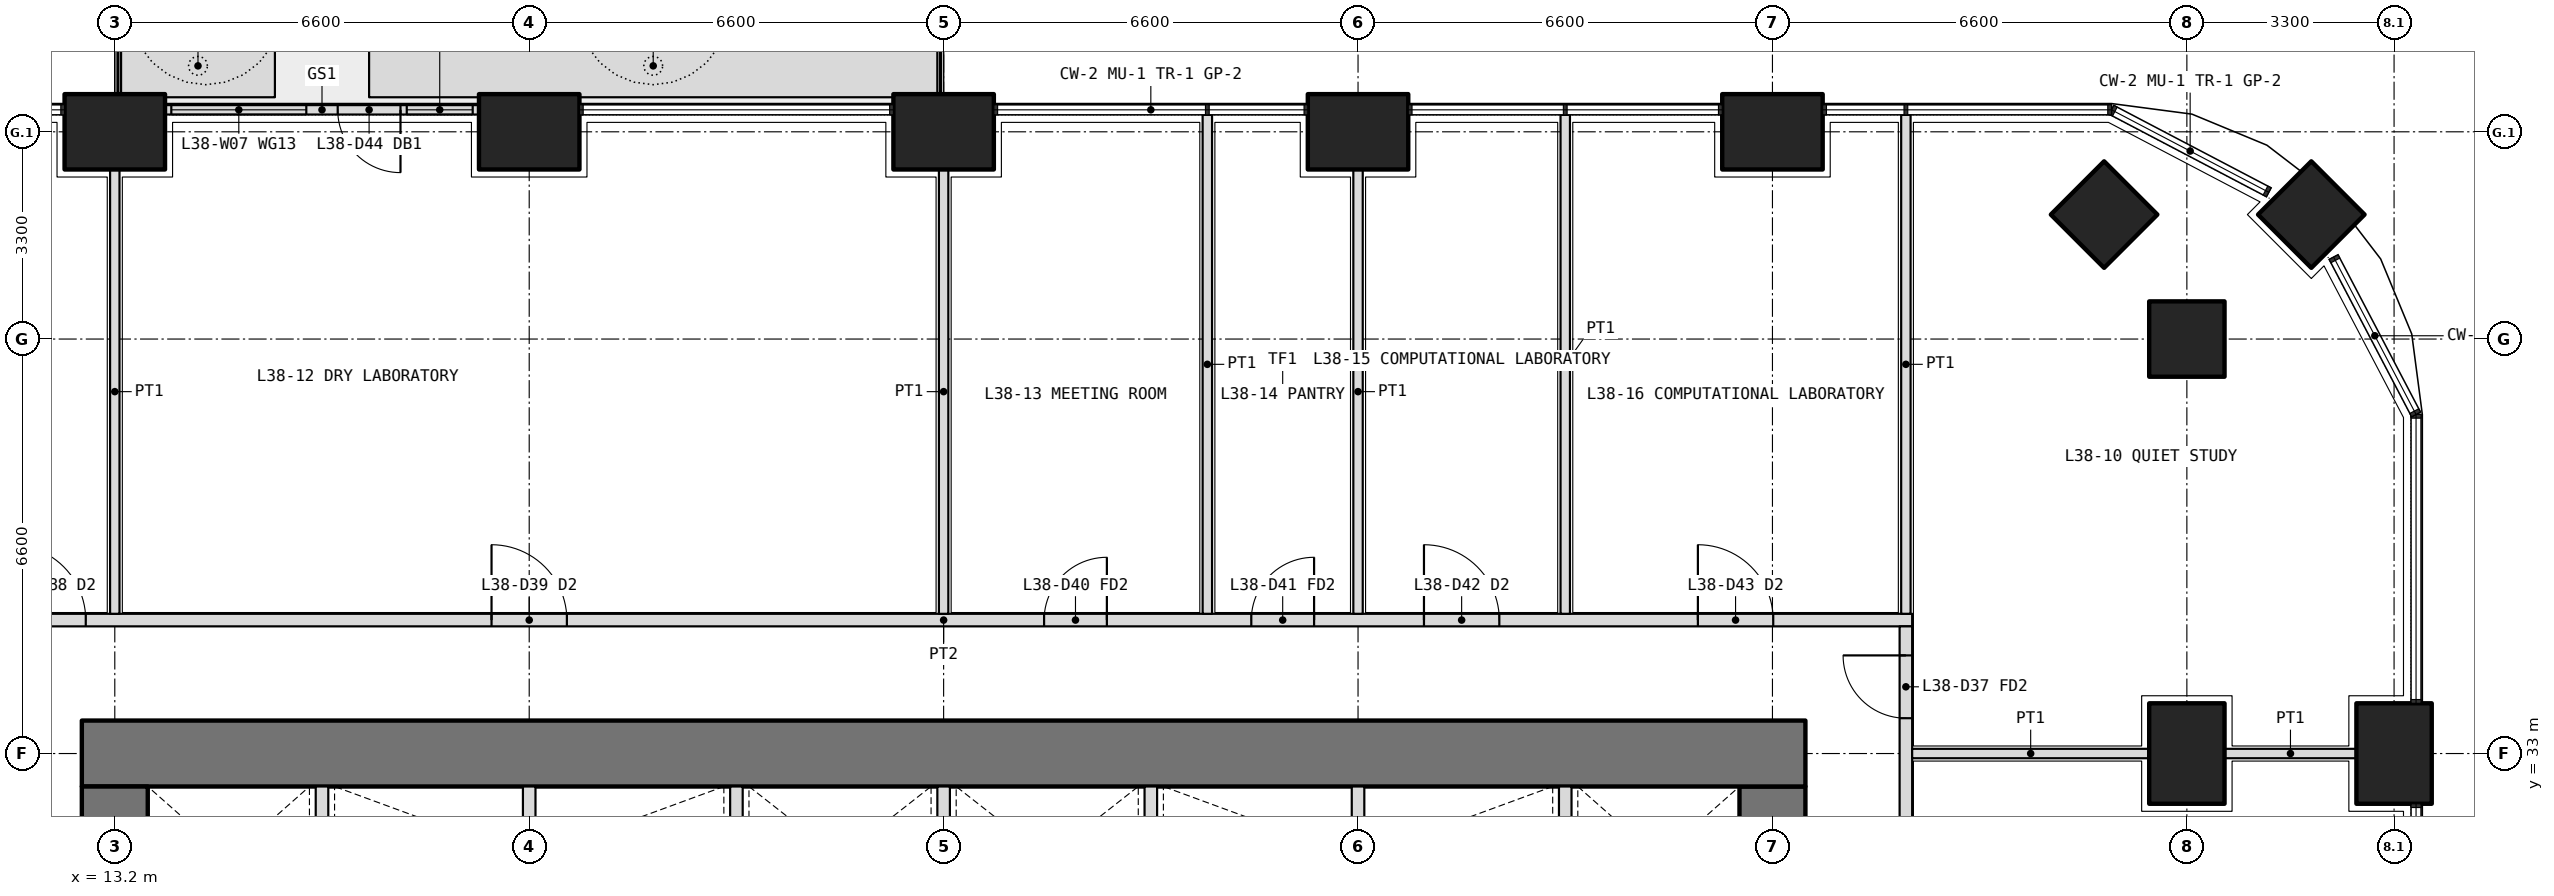
"""IFC4 building model, lengths in metres.
Left out: names, types, materials, properties, quantities, classifications, styles, units other than length and angle.
Written with IfcOpenShell. Run it as: python <this file> out.ifc"""

import sys

from ifc_helpers import new_model, si_unit, direction, frame, frame_2d, origin, origin_2d, place, context, subcontext, project, spatial, polyline, rectangle, outline, extrude, element, fill, save


model = new_model("IFC4")
c1 = context("Model", 3, precision=1e-05, world=origin(), true_north=direction((0.0, 1.0)))
c2 = subcontext(c1, "Body", "Model", "MODEL_VIEW")
j1 = project(units=[si_unit("LENGTHUNIT", "METRE"), si_unit("PLANEANGLEUNIT", "RADIAN")], contexts=[c1])
p1 = place(None, origin())
s1 = spatial("IfcSite", under=j1, at=p1, CompositionType="ELEMENT")
p2 = place(p1, origin())
s2 = spatial("IfcBuilding", under=s1, at=p2, CompositionType="ELEMENT")
p3 = place(p2, frame((0.0, 0.0, 168.3)))
s3 = spatial("IfcBuildingStorey", under=s2, at=p3, CompositionType="ELEMENT", Elevation=168.3)
p4 = place(p3, frame((48.182, 41.582, 0.0), z_axis=(0.0, 0.0, 1.0), x_axis=(0.707106781187, 0.707106781187, 0.0)))
e1 = element("IfcColumn", 1, at=p4, inside=s3, PredefinedType="COLUMN", context=c2, shape_type="SweptSolid", body=[
    extrude(rectangle(XDim=1.2, YDim=1.2, at=origin_2d()), origin(), (0.0, 0.0, 1.0), 4.2),
])
for number, where, z_axis, x_axis in (
    (2, (49.5, 33.0, 0.0), (0.0, 0.0, 1.0), (0.0, 1.0, 0.0)),
    (3, (13.2, 42.9, 0.0), (0.0, 0.0, 1.0), (1.0, 0.0, 0.0)),
    (4, (19.8, 42.9, 0.0), (0.0, 0.0, 1.0), (1.0, 0.0, 0.0)),
    (5, (26.4, 42.9, 0.0), (0.0, 0.0, 1.0), (1.0, 0.0, 0.0)),
    (6, (33.0, 42.9, 0.0), (0.0, 0.0, 1.0), (1.0, 0.0, 0.0)),
    (7, (39.6, 42.9, 0.0), (0.0, 0.0, 1.0), (1.0, 0.0, 0.0)),
):
    element("IfcColumn", number, at=place(p3, frame(where, z_axis=z_axis, x_axis=x_axis)), inside=s3, PredefinedType="COLUMN", context=c2, shape_type="SweptSolid", body=[
        extrude(rectangle(XDim=1.6, YDim=1.2, at=origin_2d()), origin(), (0.0, 0.0, 1.0), 4.2),
    ])
for number, where, z_axis, x_axis in (
    (8, (46.2, 39.6, 0.0), (0.0, 0.0, 1.0), (1.0, 0.0, 0.0)),
    (9, (44.882, 41.582, 0.0), (0.0, 0.0, 1.0), (0.707, 0.707, 0.0)),
):
    element("IfcColumn", number, at=place(p3, frame(where, z_axis=z_axis, x_axis=x_axis)), inside=s3, PredefinedType="COLUMN", context=c2, shape_type="SweptSolid", body=[
        extrude(rectangle(XDim=1.2, YDim=1.2, at=origin_2d()), origin(), (0.0, 0.0, 1.0), 4.2),
    ])
p5 = place(p3, frame((46.2, 33.0, 0.0), z_axis=(0.0, 0.0, 1.0), x_axis=(0.0, 1.0, 0.0)))
e10 = element("IfcColumn", 10, at=p5, inside=s3, PredefinedType="COLUMN", context=c2, shape_type="SweptSolid", body=[
    extrude(rectangle(XDim=1.6, YDim=1.2, at=origin_2d()), origin(), (0.0, 0.0, 1.0), 4.2),
])
p6 = place(p3, origin())
e11 = element("IfcWall", 11, at=p6, inside=s3, PredefinedType="USERDEFINED", context=c2, shape_type="SweptSolid", body=[
    extrude(outline(polyline([(13.3, 43.45), (15.75, 43.45), (15.75, 44.45), (13.3, 44.45), (13.3, 43.45)]), holes=[polyline([(13.45, 43.6), (15.6, 43.6), (15.6, 44.3), (13.45, 44.3), (13.45, 43.6)])]), origin(), (0.0, 0.0, 1.0), 1.05),
])
p7 = place(p3, origin())
e12 = element("IfcWall", 12, at=p7, inside=s3, PredefinedType="USERDEFINED", context=c2, shape_type="SweptSolid", body=[
    extrude(outline(polyline([(17.25, 43.45), (26.3, 43.45), (26.3, 44.45), (17.25, 44.45), (17.25, 43.45)]), holes=[polyline([(17.4, 43.6), (26.15, 43.6), (26.15, 44.3), (17.4, 44.3), (17.4, 43.6)])]), origin(), (0.0, 0.0, 1.0), 1.05),
])
p8 = place(p3, frame((19.0, 43.25, 0.0), z_axis=(0.0, 0.0, 1.0), x_axis=(-1.0, 0.0, 0.0)))
e13 = element("IfcWall", 13, at=p8, inside=s3, PredefinedType="SOLIDWALL", context=c2, shape_type="SweptSolid", body=[
    extrude(rectangle(XDim=5.0, YDim=0.15, at=frame_2d((2.5, 0.0))), origin(), (0.0, 0.0, 1.0), 2.7),
])
p9 = place(p8, frame((1.25, 0.0, 0.0)))
e14 = element("IfcOpeningElement", 14, at=p9, cuts=e13, PredefinedType="OPENING", context=c2, shape_type="SweptSolid", body=[
    extrude(rectangle(XDim=1.0, YDim=2.4, at=frame_2d((0.5, 1.2))), frame((0.0, 0.085, 0.0), z_axis=(0.0, -1.0, 0.0), x_axis=(1.0, 0.0, 0.0)), (0.0, 0.0, 1.0), 0.17),
])
p10 = place(p8, frame((0.1, 0.0, 0.1)))
e15 = element("IfcOpeningElement", 15, at=p10, cuts=e13, PredefinedType="OPENING", context=c2, shape_type="SweptSolid", body=[
    extrude(rectangle(XDim=1.05, YDim=2.3, at=frame_2d((0.525, 1.15))), frame((0.0, 0.085, 0.0), z_axis=(0.0, -1.0, 0.0), x_axis=(1.0, 0.0, 0.0)), (0.0, 0.0, 1.0), 0.17),
])
p11 = place(p8, frame((2.75, 0.0, 0.1)))
e16 = element("IfcOpeningElement", 16, at=p11, cuts=e13, PredefinedType="OPENING", context=c2, shape_type="SweptSolid", body=[
    extrude(rectangle(XDim=2.15, YDim=2.3, at=frame_2d((1.075, 1.15))), frame((0.0, 0.085, 0.0), z_axis=(0.0, -1.0, 0.0), x_axis=(1.0, 0.0, 0.0)), (0.0, 0.0, 1.0), 0.17),
])
p12 = place(p3, frame((39.6, 13.725, 0.0), z_axis=(0.0, 0.0, 1.0), x_axis=(0.0, 1.0, 0.0)))
e17 = element("IfcWall", 17, at=p12, inside=s3, PredefinedType="SHEAR", context=c2, shape_type="SweptSolid", body=[
    extrude(rectangle(XDim=18.75, YDim=1.05, at=frame_2d((9.375, 0.0))), origin(), (0.0, 0.0, 1.0), 4.2),
])
p13 = place(p12, frame((3.025, 0.0, 0.0)))
e18 = element("IfcOpeningElement", 18, at=p13, cuts=e17, PredefinedType="OPENING", context=c2, shape_type="SweptSolid", body=[
    extrude(rectangle(XDim=1.6, YDim=2.1, at=frame_2d((0.8, 1.05))), frame((0.0, 0.535, 0.0), z_axis=(0.0, -1.0, 0.0), x_axis=(1.0, 0.0, 0.0)), (0.0, 0.0, 1.0), 1.07),
])
p14 = place(p12, frame((13.825, 0.0, 0.0)))
e19 = element("IfcOpeningElement", 19, at=p14, cuts=e17, PredefinedType="OPENING", context=c2, shape_type="SweptSolid", body=[
    extrude(rectangle(XDim=1.6, YDim=2.1, at=frame_2d((0.8, 1.05))), frame((0.0, 0.535, 0.0), z_axis=(0.0, -1.0, 0.0), x_axis=(1.0, 0.0, 0.0)), (0.0, 0.0, 1.0), 1.07),
])
p15 = place(p3, frame((40.125, 33.0, 0.0), z_axis=(0.0, 0.0, 1.0), x_axis=(-1.0, 0.0, 0.0)))
e20 = element("IfcWall", 20, at=p15, inside=s3, PredefinedType="SHEAR", context=c2, shape_type="SweptSolid", body=[
    extrude(rectangle(XDim=27.45, YDim=1.05, at=frame_2d((13.725, 0.0))), origin(), (0.0, 0.0, 1.0), 4.2),
])
p16 = place(p3, frame((13.2, 32.475, 0.0), z_axis=(0.0, 0.0, 1.0), x_axis=(0.0, -1.0, 0.0)))
e21 = element("IfcWall", 21, at=p16, inside=s3, PredefinedType="SHEAR", context=c2, shape_type="SweptSolid", body=[
    extrude(rectangle(XDim=18.75, YDim=1.05, at=frame_2d((9.375, 0.0))), origin(), (0.0, 0.0, 1.0), 4.2),
])
p17 = place(p16, frame((14.125, 0.0, 0.0)))
e22 = element("IfcOpeningElement", 22, at=p17, cuts=e21, PredefinedType="OPENING", context=c2, shape_type="SweptSolid", body=[
    extrude(rectangle(XDim=1.6, YDim=2.1, at=frame_2d((0.8, 1.05))), frame((0.0, 0.535, 0.0), z_axis=(0.0, -1.0, 0.0), x_axis=(1.0, 0.0, 0.0)), (0.0, 0.0, 1.0), 1.07),
])
p18 = place(p16, frame((3.325, 0.0, 0.0)))
e23 = element("IfcOpeningElement", 23, at=p18, cuts=e21, PredefinedType="OPENING", context=c2, shape_type="SweptSolid", body=[
    extrude(rectangle(XDim=1.6, YDim=2.1, at=frame_2d((0.8, 1.05))), frame((0.0, 0.535, 0.0), z_axis=(0.0, -1.0, 0.0), x_axis=(1.0, 0.0, 0.0)), (0.0, 0.0, 1.0), 1.07),
])
for number, where, z_axis, x_axis in (
    (24, (16.5, 30.2, 0.0), (0.0, 0.0, 1.0), (0.0, 1.0, 0.0)),
    (25, (19.8, 30.2, 0.0), (0.0, 0.0, 1.0), (0.0, 1.0, 0.0)),
    (26, (23.1, 30.2, 0.0), (0.0, 0.0, 1.0), (0.0, 1.0, 0.0)),
    (27, (26.4, 30.2, 0.0), (0.0, 0.0, 1.0), (0.0, 1.0, 0.0)),
    (28, (29.7, 30.2, 0.0), (0.0, 0.0, 1.0), (0.0, 1.0, 0.0)),
    (29, (33.0, 30.2, 0.0), (0.0, 0.0, 1.0), (0.0, 1.0, 0.0)),
    (30, (36.3, 30.2, 0.0), (0.0, 0.0, 1.0), (0.0, 1.0, 0.0)),
):
    element("IfcWall", number, at=place(p3, frame(where, z_axis=z_axis, x_axis=x_axis)), inside=s3, PredefinedType="PARTITIONING", context=c2, shape_type="SweptSolid", body=[
        extrude(rectangle(XDim=2.275, YDim=0.2, at=frame_2d((1.138, 0.0))), origin(), (0.0, 0.0, 1.0), 4.2),
    ])
p19 = place(p3, frame((10.975, 35.125, 0.0), z_axis=(0.0, 0.0, 1.0), x_axis=(1.0, 0.0, 0.0)))
e31 = element("IfcWall", 31, at=p19, inside=s3, PredefinedType="PARTITIONING", context=c2, shape_type="SweptSolid", body=[
    extrude(rectangle(XDim=30.85, YDim=0.2, at=frame_2d((15.425, 0.0))), origin(), (0.0, 0.0, 1.0), 2.85),
])
p20 = place(p19, frame((0.562, 0.0, 0.0)))
e32 = element("IfcOpeningElement", 32, at=p20, cuts=e31, PredefinedType="OPENING", context=c2, shape_type="SweptSolid", body=[
    extrude(rectangle(XDim=1.2, YDim=2.1, at=frame_2d((0.6, 1.05))), frame((0.0, 0.11, 0.0), z_axis=(0.0, -1.0, 0.0), x_axis=(1.0, 0.0, 0.0)), (0.0, 0.0, 1.0), 0.22),
])
p21 = place(p19, frame((8.225, 0.0, 0.0)))
e33 = element("IfcOpeningElement", 33, at=p21, cuts=e31, PredefinedType="OPENING", context=c2, shape_type="SweptSolid", body=[
    extrude(rectangle(XDim=1.2, YDim=2.1, at=frame_2d((0.6, 1.05))), frame((0.0, 0.11, 0.0), z_axis=(0.0, -1.0, 0.0), x_axis=(1.0, 0.0, 0.0)), (0.0, 0.0, 1.0), 0.22),
])
p22 = place(p19, frame((17.025, 0.0, 0.0)))
e34 = element("IfcOpeningElement", 34, at=p22, cuts=e31, PredefinedType="OPENING", context=c2, shape_type="SweptSolid", body=[
    extrude(rectangle(XDim=1.0, YDim=2.1, at=frame_2d((0.5, 1.05))), frame((0.0, 0.11, 0.0), z_axis=(0.0, -1.0, 0.0), x_axis=(1.0, 0.0, 0.0)), (0.0, 0.0, 1.0), 0.22),
])
p23 = place(p19, frame((20.325, 0.0, 0.0)))
e35 = element("IfcOpeningElement", 35, at=p23, cuts=e31, PredefinedType="OPENING", context=c2, shape_type="SweptSolid", body=[
    extrude(rectangle(XDim=1.0, YDim=2.1, at=frame_2d((0.5, 1.05))), frame((0.0, 0.11, 0.0), z_axis=(0.0, -1.0, 0.0), x_axis=(1.0, 0.0, 0.0)), (0.0, 0.0, 1.0), 0.22),
])
p24 = place(p19, frame((23.075, 0.0, 0.0)))
e36 = element("IfcOpeningElement", 36, at=p24, cuts=e31, PredefinedType="OPENING", context=c2, shape_type="SweptSolid", body=[
    extrude(rectangle(XDim=1.2, YDim=2.1, at=frame_2d((0.6, 1.05))), frame((0.0, 0.11, 0.0), z_axis=(0.0, -1.0, 0.0), x_axis=(1.0, 0.0, 0.0)), (0.0, 0.0, 1.0), 0.22),
])
p25 = place(p19, frame((27.438, 0.0, 0.0)))
e37 = element("IfcOpeningElement", 37, at=p25, cuts=e31, PredefinedType="OPENING", context=c2, shape_type="SweptSolid", body=[
    extrude(rectangle(XDim=1.2, YDim=2.1, at=frame_2d((0.6, 1.05))), frame((0.0, 0.11, 0.0), z_axis=(0.0, -1.0, 0.0), x_axis=(1.0, 0.0, 0.0)), (0.0, 0.0, 1.0), 0.22),
])
p26 = place(p3, frame((41.725, 11.175, 0.0), z_axis=(0.0, 0.0, 1.0), x_axis=(0.0, 1.0, 0.0)))
e38 = element("IfcWall", 38, at=p26, inside=s3, PredefinedType="PARTITIONING", context=c2, shape_type="SweptSolid", body=[
    extrude(rectangle(XDim=23.85, YDim=0.2, at=frame_2d((11.925, 0.0))), origin(), (0.0, 0.0, 1.0), 2.85),
])
p27 = place(p26, frame((3.762, 0.0, 0.0)))
e39 = element("IfcOpeningElement", 39, at=p27, cuts=e38, PredefinedType="OPENING", context=c2, shape_type="SweptSolid", body=[
    extrude(rectangle(XDim=1.0, YDim=2.1, at=frame_2d((0.5, 1.05))), frame((0.0, 0.11, 0.0), z_axis=(0.0, -1.0, 0.0), x_axis=(1.0, 0.0, 0.0)), (0.0, 0.0, 1.0), 0.22),
])
p28 = place(p26, frame((9.625, 0.0, 0.0)))
e40 = element("IfcOpeningElement", 40, at=p28, cuts=e38, PredefinedType="OPENING", context=c2, shape_type="SweptSolid", body=[
    extrude(rectangle(XDim=1.0, YDim=2.1, at=frame_2d((0.5, 1.05))), frame((0.0, 0.11, 0.0), z_axis=(0.0, -1.0, 0.0), x_axis=(1.0, 0.0, 0.0)), (0.0, 0.0, 1.0), 0.22),
])
p29 = place(p26, frame((12.975, 0.0, 0.0)))
e41 = element("IfcOpeningElement", 41, at=p29, cuts=e38, PredefinedType="OPENING", context=c2, shape_type="SweptSolid", body=[
    extrude(rectangle(XDim=0.9, YDim=2.1, at=frame_2d((0.45, 1.05))), frame((0.0, 0.11, 0.0), z_axis=(0.0, -1.0, 0.0), x_axis=(1.0, 0.0, 0.0)), (0.0, 0.0, 1.0), 0.22),
])
p30 = place(p26, frame((17.925, 0.0, 0.0)))
e42 = element("IfcOpeningElement", 42, at=p30, cuts=e38, PredefinedType="OPENING", context=c2, shape_type="SweptSolid", body=[
    extrude(rectangle(XDim=1.2, YDim=2.1, at=frame_2d((0.6, 1.05))), frame((0.0, 0.11, 0.0), z_axis=(0.0, -1.0, 0.0), x_axis=(1.0, 0.0, 0.0)), (0.0, 0.0, 1.0), 0.22),
])
p31 = place(p26, frame((22.387, 0.0, 0.0)))
e43 = element("IfcOpeningElement", 43, at=p31, cuts=e38, PredefinedType="OPENING", context=c2, shape_type="SweptSolid", body=[
    extrude(rectangle(XDim=1.0, YDim=2.1, at=frame_2d((0.5, 1.05))), frame((0.0, 0.11, 0.0), z_axis=(0.0, -1.0, 0.0), x_axis=(1.0, 0.0, 0.0)), (0.0, 0.0, 1.0), 0.22),
])
p32 = place(p3, frame((41.725, 43.17, 0.0), z_axis=(0.0, 0.0, 1.0), x_axis=(0.0, -1.0, 0.0)))
e44 = element("IfcWall", 44, at=p32, inside=s3, PredefinedType="PARTITIONING", context=c2, shape_type="SweptSolid", body=[
    extrude(rectangle(XDim=7.945, YDim=0.15, at=frame_2d((3.972, 0.0))), origin(), (0.0, 0.0, 1.0), 2.7),
])
p33 = place(p3, frame((48.9, 33.0, 0.0), z_axis=(0.0, 0.0, 1.0), x_axis=(-1.0, 0.0, 0.0)))
e45 = element("IfcWall", 45, at=p33, inside=s3, PredefinedType="PARTITIONING", context=c2, shape_type="SweptSolid", body=[
    extrude(rectangle(XDim=2.1, YDim=0.15, at=frame_2d((1.05, 0.0))), origin(), (0.0, 0.0, 1.0), 2.85),
])
p34 = place(p3, frame((45.6, 33.0, 0.0), z_axis=(0.0, 0.0, 1.0), x_axis=(-1.0, 0.0, 0.0)))
e46 = element("IfcWall", 46, at=p34, inside=s3, PredefinedType="PARTITIONING", context=c2, shape_type="SweptSolid", body=[
    extrude(rectangle(XDim=3.775, YDim=0.15, at=frame_2d((1.888, 0.0))), origin(), (0.0, 0.0, 1.0), 2.85),
])
p35 = place(p3, frame((30.6, 43.17, 0.0), z_axis=(0.0, 0.0, 1.0), x_axis=(0.0, -1.0, 0.0)))
e47 = element("IfcWall", 47, at=p35, inside=s3, PredefinedType="PARTITIONING", context=c2, shape_type="SweptSolid", body=[
    extrude(rectangle(XDim=7.945, YDim=0.15, at=frame_2d((3.972, 0.0))), origin(), (0.0, 0.0, 1.0), 2.7),
])
for number, where, z_axis, x_axis in (
    (48, (33.0, 42.3, 0.0), (0.0, 0.0, 1.0), (0.0, -1.0, 0.0)),
    (49, (13.2, 42.3, 0.0), (0.0, 0.0, 1.0), (0.0, -1.0, 0.0)),
    (50, (26.4, 42.3, 0.0), (0.0, 0.0, 1.0), (0.0, -1.0, 0.0)),
):
    element("IfcWall", number, at=place(p3, frame(where, z_axis=z_axis, x_axis=x_axis)), inside=s3, PredefinedType="PARTITIONING", context=c2, shape_type="SweptSolid", body=[
        extrude(rectangle(XDim=7.075, YDim=0.15, at=frame_2d((3.538, 0.0))), origin(), (0.0, 0.0, 1.0), 2.85),
    ])
p36 = place(p3, frame((36.3, 43.17, 0.0), z_axis=(0.0, 0.0, 1.0), x_axis=(0.0, -1.0, 0.0)))
e51 = element("IfcWall", 51, at=p36, inside=s3, PredefinedType="PARTITIONING", context=c2, shape_type="SweptSolid", body=[
    extrude(rectangle(XDim=7.945, YDim=0.15, at=frame_2d((3.972, 0.0))), origin(), (0.0, 0.0, 1.0), 2.7),
])
p37 = place(p9, origin())
e52 = element("IfcDoor", 52, at=p37, inside=s3, OperationType="SINGLE_SWING_LEFT", PredefinedType="DOOR", context=c2, shape_type="SweptSolid", body=[
    extrude(rectangle(XDim=1.0, YDim=2.4, at=frame_2d((0.5, 1.2))), frame((0.0, 0.025, 0.0), z_axis=(0.0, -1.0, 0.0), x_axis=(1.0, 0.0, 0.0)), (0.0, 0.0, 1.0), 0.05),
])
fill(e14, e52)
p38 = place(p10, origin())
e53 = element("IfcWindow", 53, at=p38, inside=s3, PartitioningType="SINGLE_PANEL", PredefinedType="WINDOW", context=c2, shape_type="SweptSolid", body=[
    extrude(rectangle(XDim=1.05, YDim=2.3, at=frame_2d((0.525, 1.15))), frame((0.0, 0.03, 0.0), z_axis=(0.0, -1.0, 0.0), x_axis=(1.0, 0.0, 0.0)), (0.0, 0.0, 1.0), 0.06),
])
fill(e15, e53)
p39 = place(p11, origin())
e54 = element("IfcWindow", 54, at=p39, inside=s3, PartitioningType="SINGLE_PANEL", PredefinedType="WINDOW", context=c2, shape_type="SweptSolid", body=[
    extrude(rectangle(XDim=2.15, YDim=2.3, at=frame_2d((1.075, 1.15))), frame((0.0, 0.03, 0.0), z_axis=(0.0, -1.0, 0.0), x_axis=(1.0, 0.0, 0.0)), (0.0, 0.0, 1.0), 0.06),
])
fill(e16, e54)
p40 = place(p31, origin())
e55 = element("IfcDoor", 55, at=p40, inside=s3, OperationType="SINGLE_SWING_RIGHT", PredefinedType="DOOR", context=c2, shape_type="SweptSolid", body=[
    extrude(rectangle(XDim=1.0, YDim=2.1, at=frame_2d((0.5, 1.05))), frame((0.0, 0.025, 0.0), z_axis=(0.0, -1.0, 0.0), x_axis=(1.0, 0.0, 0.0)), (0.0, 0.0, 1.0), 0.05),
])
fill(e43, e55)
p41 = place(p20, origin())
e56 = element("IfcDoor", 56, at=p41, inside=s3, OperationType="DOUBLE_DOOR_SINGLE_SWING", PredefinedType="DOOR", context=c2, shape_type="SweptSolid", body=[
    extrude(rectangle(XDim=1.2, YDim=2.1, at=frame_2d((0.6, 1.05))), frame((0.0, 0.025, 0.0), z_axis=(0.0, -1.0, 0.0), x_axis=(1.0, 0.0, 0.0)), (0.0, 0.0, 1.0), 0.05),
])
fill(e32, e56)
p42 = place(p21, origin())
e57 = element("IfcDoor", 57, at=p42, inside=s3, OperationType="DOUBLE_DOOR_SINGLE_SWING", PredefinedType="DOOR", context=c2, shape_type="SweptSolid", body=[
    extrude(rectangle(XDim=1.2, YDim=2.1, at=frame_2d((0.6, 1.05))), frame((0.0, 0.025, 0.0), z_axis=(0.0, -1.0, 0.0), x_axis=(1.0, 0.0, 0.0)), (0.0, 0.0, 1.0), 0.05),
])
fill(e33, e57)
p43 = place(p22, origin())
e58 = element("IfcDoor", 58, at=p43, inside=s3, OperationType="SINGLE_SWING_RIGHT", PredefinedType="DOOR", context=c2, shape_type="SweptSolid", body=[
    extrude(rectangle(XDim=1.0, YDim=2.1, at=frame_2d((0.5, 1.05))), frame((0.0, 0.025, 0.0), z_axis=(0.0, -1.0, 0.0), x_axis=(1.0, 0.0, 0.0)), (0.0, 0.0, 1.0), 0.05),
])
fill(e34, e58)
p44 = place(p23, origin())
e59 = element("IfcDoor", 59, at=p44, inside=s3, OperationType="SINGLE_SWING_RIGHT", PredefinedType="DOOR", context=c2, shape_type="SweptSolid", body=[
    extrude(rectangle(XDim=1.0, YDim=2.1, at=frame_2d((0.5, 1.05))), frame((0.0, 0.025, 0.0), z_axis=(0.0, -1.0, 0.0), x_axis=(1.0, 0.0, 0.0)), (0.0, 0.0, 1.0), 0.05),
])
fill(e35, e59)
p45 = place(p24, origin())
e60 = element("IfcDoor", 60, at=p45, inside=s3, OperationType="DOUBLE_DOOR_SINGLE_SWING", PredefinedType="DOOR", context=c2, shape_type="SweptSolid", body=[
    extrude(rectangle(XDim=1.2, YDim=2.1, at=frame_2d((0.6, 1.05))), frame((0.0, 0.025, 0.0), z_axis=(0.0, -1.0, 0.0), x_axis=(1.0, 0.0, 0.0)), (0.0, 0.0, 1.0), 0.05),
])
fill(e36, e60)
p46 = place(p25, origin())
e61 = element("IfcDoor", 61, at=p46, inside=s3, OperationType="DOUBLE_DOOR_SINGLE_SWING", PredefinedType="DOOR", context=c2, shape_type="SweptSolid", body=[
    extrude(rectangle(XDim=1.2, YDim=2.1, at=frame_2d((0.6, 1.05))), frame((0.0, 0.025, 0.0), z_axis=(0.0, -1.0, 0.0), x_axis=(1.0, 0.0, 0.0)), (0.0, 0.0, 1.0), 0.05),
])
fill(e37, e61)
save(model, sys.argv[1])
